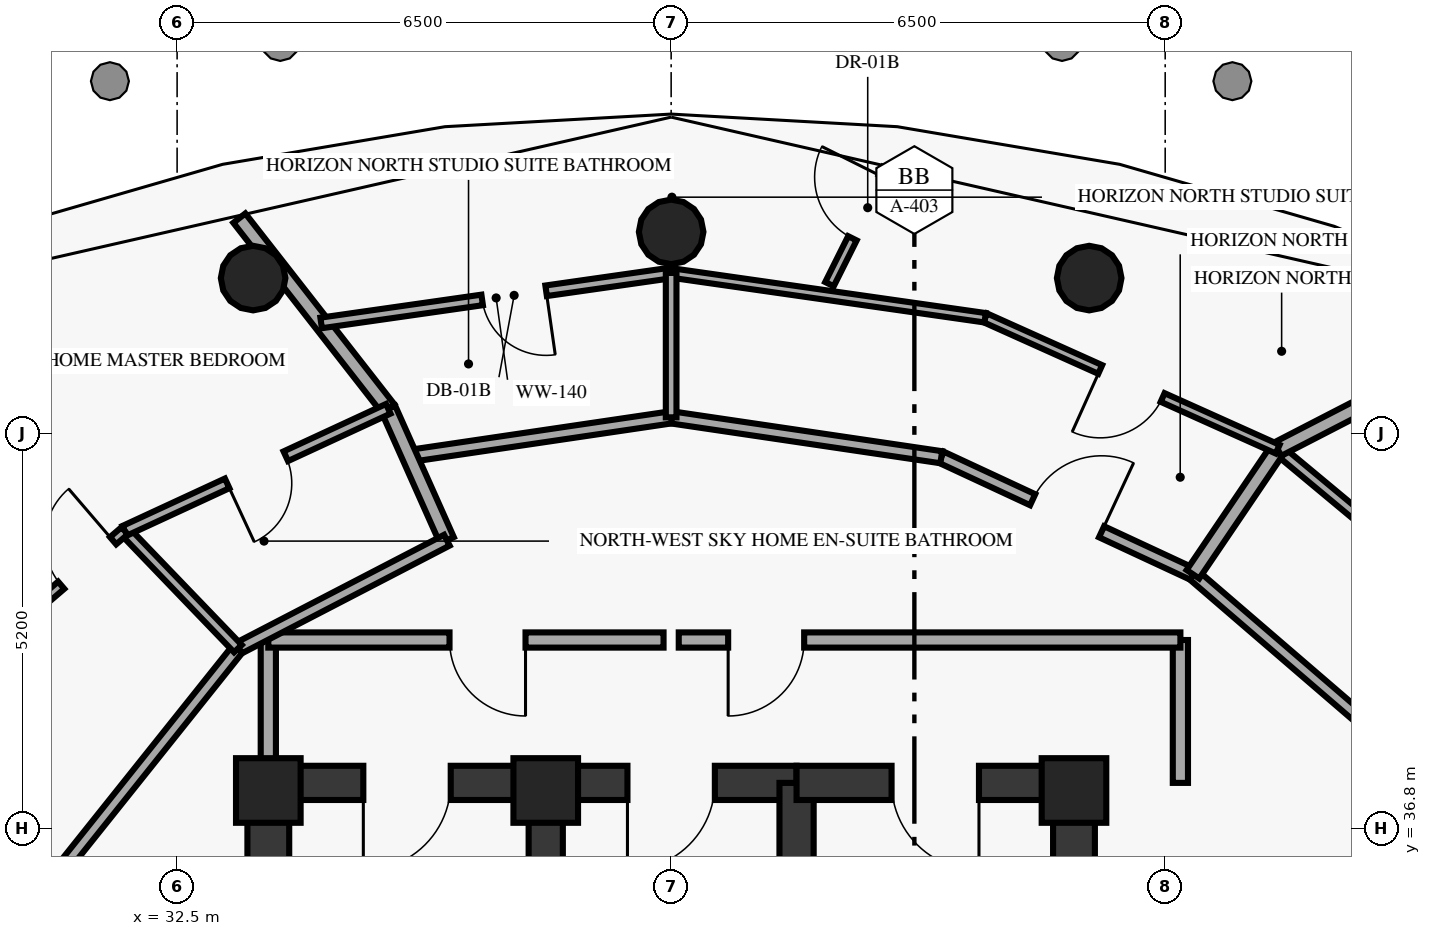
"""IFC4 building model, lengths in metres.
Left out: names, types, materials, properties, quantities, classifications, styles, units other than length and angle.
Written with IfcOpenShell. Run it as: python <this file> out.ifc"""

import sys

from ifc_helpers import new_model, si_unit, direction, frame, frame_2d, origin, origin_2d, place, context, subcontext, project, spatial, rectangle, circle, extrude, element, fill, save


model = new_model("IFC4")
c1 = context("Model", 3, precision=1e-05, world=origin(), true_north=direction((0.0, 1.0)))
c2 = subcontext(c1, "Body", "Model", "MODEL_VIEW")
j1 = project(units=[si_unit("LENGTHUNIT", "METRE"), si_unit("PLANEANGLEUNIT", "RADIAN")], contexts=[c1])
p1 = place(None, origin())
s1 = spatial("IfcSite", under=j1, at=p1, CompositionType="ELEMENT")
p2 = place(p1, origin())
s2 = spatial("IfcBuilding", under=s1, at=p2, CompositionType="ELEMENT")
p3 = place(p2, frame((0.0, 0.0, 251.95)))
s3 = spatial("IfcBuildingStorey", under=s2, at=p3, CompositionType="ELEMENT", Elevation=251.95)
for number, where, z_axis, x_axis in (
    (1, (44.3, 37.3, 0.0), (0.0, 0.0, 1.0), (1.0, 0.0, 0.0)),
    (2, (37.35, 37.3, 0.0), (0.0, 0.0, 1.0), (1.0, 0.0, 0.0)),
    (3, (33.7, 37.3, 0.0), (0.0, 0.0, 1.0), (1.0, 0.0, 0.0)),
):
    element("IfcColumn", number, at=place(p3, frame(where, z_axis=z_axis, x_axis=x_axis)), inside=s3, PredefinedType="PILASTER", context=c2, shape_type="SweptSolid", body=[
        extrude(rectangle(XDim=0.85, YDim=0.85, at=origin_2d()), origin(), (0.0, 0.0, 1.0), 3.39),
    ])
for number, where, z_axis, x_axis in (
    (4, (44.5, 44.042, 0.0), (0.0, 0.0, 1.0), (1.0, 0.0, 0.0)),
    (5, (39.0, 44.65, 0.0), (0.0, 0.0, 1.0), (1.0, 0.0, 0.0)),
    (6, (33.5, 44.042, 0.0), (0.0, 0.0, 1.0), (1.0, 0.0, 0.0)),
):
    element("IfcColumn", number, at=place(p3, frame(where, z_axis=z_axis, x_axis=x_axis)), inside=s3, PredefinedType="COLUMN", context=c2, shape_type="SweptSolid", body=[
        extrude(circle(Radius=0.425, at=origin_2d()), origin(), (0.0, 0.0, 1.0), 3.39),
    ])
for number, where, z_axis, x_axis in (
    (7, (33.7, 29.05, 0.0), (0.0, 0.0, 1.0), (0.0, 1.0, 0.0)),
    (8, (44.3, 29.05, 0.0), (0.0, 0.0, 1.0), (0.0, 1.0, 0.0)),
):
    element("IfcWall", number, at=place(p3, frame(where, z_axis=z_axis, x_axis=x_axis)), inside=s3, PredefinedType="SHEAR", context=c2, shape_type="SweptSolid", body=[
        extrude(rectangle(XDim=8.35, YDim=0.55, at=frame_2d((4.175, 0.0))), origin(), (0.0, 0.0, 1.0), 3.39),
    ])
p4 = place(p3, frame((37.35, 37.4, 0.0), z_axis=(0.0, 0.0, 1.0), x_axis=(-1.0, 0.0, 0.0)))
e9 = element("IfcWall", 9, at=p4, inside=s3, PredefinedType="SHEAR", context=c2, shape_type="SweptSolid", body=[
    extrude(rectangle(XDim=3.65, YDim=0.45, at=frame_2d((1.825, 0.0))), origin(), (0.0, 0.0, 1.0), 3.39),
])
p5 = place(p4, frame((1.25, 0.0, 0.0)))
e10 = element("IfcOpeningElement", 10, at=p5, cuts=e9, PredefinedType="OPENING", context=c2, shape_type="SweptSolid", body=[
    extrude(rectangle(XDim=1.15, YDim=2.15, at=frame_2d((0.575, 1.075))), frame((0.0, 0.235, 0.0), z_axis=(0.0, -1.0, 0.0), x_axis=(1.0, 0.0, 0.0)), (0.0, 0.0, 1.0), 0.47),
])
p6 = place(p3, frame((37.35, 29.05, 0.0), z_axis=(0.0, 0.0, 1.0), x_axis=(0.0, 1.0, 0.0)))
e11 = element("IfcWall", 11, at=p6, inside=s3, PredefinedType="SHEAR", context=c2, shape_type="SweptSolid", body=[
    extrude(rectangle(XDim=8.35, YDim=0.45, at=frame_2d((4.175, 0.0))), origin(), (0.0, 0.0, 1.0), 3.39),
])
p7 = place(p3, frame((40.65, 37.4, 0.0), z_axis=(0.0, 0.0, 1.0), x_axis=(-1.0, 0.0, 0.0)))
e12 = element("IfcWall", 12, at=p7, inside=s3, PredefinedType="SHEAR", context=c2, shape_type="SweptSolid", body=[
    extrude(rectangle(XDim=3.3, YDim=0.45, at=frame_2d((1.65, 0.0))), origin(), (0.0, 0.0, 1.0), 3.39),
])
p8 = place(p7, frame((1.075, 0.0, 0.0)))
e13 = element("IfcOpeningElement", 13, at=p8, cuts=e12, PredefinedType="OPENING", context=c2, shape_type="SweptSolid", body=[
    extrude(rectangle(XDim=1.15, YDim=2.15, at=frame_2d((0.575, 1.075))), frame((0.0, 0.235, 0.0), z_axis=(0.0, -1.0, 0.0), x_axis=(1.0, 0.0, 0.0)), (0.0, 0.0, 1.0), 0.47),
])
p9 = place(p3, frame((40.65, 29.05, 0.0), z_axis=(0.0, 0.0, 1.0), x_axis=(0.0, 1.0, 0.0)))
e14 = element("IfcWall", 14, at=p9, inside=s3, PredefinedType="SHEAR", context=c2, shape_type="SweptSolid", body=[
    extrude(rectangle(XDim=8.35, YDim=0.45, at=frame_2d((4.175, 0.0))), origin(), (0.0, 0.0, 1.0), 3.39),
])
p10 = place(p3, frame((44.3, 37.4, 0.0), z_axis=(0.0, 0.0, 1.0), x_axis=(-1.0, 0.0, 0.0)))
e15 = element("IfcWall", 15, at=p10, inside=s3, PredefinedType="SHEAR", context=c2, shape_type="SweptSolid", body=[
    extrude(rectangle(XDim=3.65, YDim=0.45, at=frame_2d((1.825, 0.0))), origin(), (0.0, 0.0, 1.0), 3.39),
])
p11 = place(p10, frame((1.25, 0.0, 0.0)))
e16 = element("IfcOpeningElement", 16, at=p11, cuts=e15, PredefinedType="OPENING", context=c2, shape_type="SweptSolid", body=[
    extrude(rectangle(XDim=1.15, YDim=2.15, at=frame_2d((0.575, 1.075))), frame((0.0, 0.235, 0.0), z_axis=(0.0, -1.0, 0.0), x_axis=(1.0, 0.0, 0.0)), (0.0, 0.0, 1.0), 0.47),
])
for number, where, z_axis, x_axis in (
    (17, (33.7, 37.4, 0.0), (0.0, 0.0, 1.0), (0.0, 1.0, 0.0)),
    (18, (45.7, 37.4, 0.0), (0.0, 0.0, 1.0), (0.0, 1.0, 0.0)),
):
    element("IfcWall", number, at=place(p3, frame(where, z_axis=z_axis, x_axis=x_axis)), inside=s3, PredefinedType="SOLIDWALL", context=c2, shape_type="SweptSolid", body=[
        extrude(rectangle(XDim=1.88, YDim=0.2, at=frame_2d((0.94, 0.0))), origin(), (0.0, 0.0, 1.0), 3.39),
    ])
p12 = place(p3, frame((38.9, 39.28, 0.0), z_axis=(0.0, 0.0, 1.0), x_axis=(-1.0, 0.0, 0.0)))
e19 = element("IfcWall", 19, at=p12, inside=s3, PredefinedType="SOLIDWALL", context=c2, shape_type="SweptSolid", body=[
    extrude(rectangle(XDim=5.2, YDim=0.2, at=frame_2d((2.6, 0.0))), origin(), (0.0, 0.0, 1.0), 3.39),
])
p13 = place(p12, frame((1.816, 0.0, 0.0)))
e20 = element("IfcOpeningElement", 20, at=p13, cuts=e19, PredefinedType="OPENING", context=c2, shape_type="SweptSolid", body=[
    extrude(rectangle(XDim=1.0, YDim=2.02, at=frame_2d((0.5, 1.01))), frame((0.0, 0.11, 0.0), z_axis=(0.0, -1.0, 0.0), x_axis=(1.0, 0.0, 0.0)), (0.0, 0.0, 1.0), 0.22),
])
p14 = place(p3, frame((45.7, 39.28, 0.0), z_axis=(0.0, 0.0, 1.0), x_axis=(-1.0, 0.0, 0.0)))
e21 = element("IfcWall", 21, at=p14, inside=s3, PredefinedType="SOLIDWALL", context=c2, shape_type="SweptSolid", body=[
    extrude(rectangle(XDim=6.6, YDim=0.2, at=frame_2d((3.3, 0.0))), origin(), (0.0, 0.0, 1.0), 3.39),
])
p15 = place(p14, frame((4.95, 0.0, 0.0)))
e22 = element("IfcOpeningElement", 22, at=p15, cuts=e21, PredefinedType="OPENING", context=c2, shape_type="SweptSolid", body=[
    extrude(rectangle(XDim=1.0, YDim=2.02, at=frame_2d((0.5, 1.01))), frame((0.0, 0.11, 0.0), z_axis=(0.0, -1.0, 0.0), x_axis=(1.0, 0.0, 0.0)), (0.0, 0.0, 1.0), 0.22),
])
p16 = place(p3, frame((48.709, 37.697, 0.0), z_axis=(0.0, 0.0, 1.0), x_axis=(-0.75790014932, 0.652370572344, 0.0)))
e23 = element("IfcWall", 23, at=p16, inside=s3, PredefinedType="PARTITIONING", context=c2, shape_type="SweptSolid", body=[
    extrude(rectangle(XDim=3.752, YDim=0.16, at=frame_2d((1.876, 0.0))), origin(), (0.0, 0.0, 1.0), 3.39),
])
p17 = place(p3, frame((42.554, 41.685, 0.0), z_axis=(0.0, 0.0, 1.0), x_axis=(0.906718733669, -0.421735862851, 0.0)))
e24 = element("IfcWall", 24, at=p17, inside=s3, PredefinedType="PARTITIONING", context=c2, shape_type="SweptSolid", body=[
    extrude(rectangle(XDim=3.652, YDim=0.16, at=frame_2d((1.826, 0.0))), origin(), (0.0, 0.0, 1.0), 3.39),
])
p18 = place(p17, frame((1.326, 0.0, 0.0)))
e25 = element("IfcOpeningElement", 25, at=p18, cuts=e24, PredefinedType="OPENING", context=c2, shape_type="SweptSolid", body=[
    extrude(rectangle(XDim=1.0, YDim=2.02, at=frame_2d((0.5, 1.01))), frame((0.0, 0.09, 0.0), z_axis=(0.0, -1.0, 0.0), x_axis=(1.0, 0.0, 0.0)), (0.0, 0.0, 1.0), 0.18),
])
p19 = place(p3, frame((42.554, 41.685, 0.0), z_axis=(0.0, 0.0, 1.0), x_axis=(-0.989268313231, 0.146110247541, 0.0)))
e26 = element("IfcWall", 26, at=p19, inside=s3, PredefinedType="PARTITIONING", context=c2, shape_type="SweptSolid", body=[
    extrude(rectangle(XDim=3.593, YDim=0.16, at=frame_2d((1.796, 0.0))), origin(), (0.0, 0.0, 1.0), 3.39),
])
p20 = place(p3, frame((39.0, 42.21, 0.0), z_axis=(0.0, 0.0, 1.0), x_axis=(-0.989259474357, -0.146170080365, 0.0)))
e27 = element("IfcWall", 27, at=p20, inside=s3, PredefinedType="PARTITIONING", context=c2, shape_type="SweptSolid", body=[
    extrude(rectangle(XDim=3.482, YDim=0.16, at=frame_2d((1.741, 0.0))), origin(), (0.0, 0.0, 1.0), 3.39),
])
p21 = place(p3, frame((36.049, 40.593, 0.0), z_axis=(0.0, 0.0, 1.0), x_axis=(-0.407262922325, 0.913310961338, 0.0)))
e28 = element("IfcWall", 28, at=p21, inside=s3, PredefinedType="PARTITIONING", context=c2, shape_type="SweptSolid", body=[
    extrude(rectangle(XDim=1.893, YDim=0.2, at=frame_2d((0.947, 0.0))), origin(), (0.0, 0.0, 1.0), 3.39),
])
p22 = place(p3, frame((35.278, 42.322, 0.0), z_axis=(0.0, 0.0, 1.0), x_axis=(-0.615410344966, 0.788206893721, 0.0)))
e29 = element("IfcWall", 29, at=p22, inside=s3, PredefinedType="PARTITIONING", context=c2, shape_type="SweptSolid", body=[
    extrude(rectangle(XDim=3.183, YDim=0.2, at=frame_2d((1.592, 0.0))), origin(), (0.0, 0.0, 1.0), 3.39),
])
p23 = place(p3, frame((46.98, 41.791, 0.0), z_axis=(0.0, 0.0, 1.0), x_axis=(0.768632414363, -0.639690715573, 0.0)))
e30 = element("IfcWall", 30, at=p23, inside=s3, PredefinedType="PARTITIONING", context=c2, shape_type="SweptSolid", body=[
    extrude(rectangle(XDim=1.606, YDim=0.14, at=frame_2d((0.803, 0.0))), origin(), (0.0, 0.0, 1.0), 3.39),
])
p24 = place(p3, frame((45.865, 40.145, 0.0), z_axis=(0.0, 0.0, 1.0), x_axis=(0.560834568606, 0.827927887353, 0.0)))
e31 = element("IfcWall", 31, at=p24, inside=s3, PredefinedType="PARTITIONING", context=c2, shape_type="SweptSolid", body=[
    extrude(rectangle(XDim=1.988, YDim=0.2, at=frame_2d((0.994, 0.0))), origin(), (0.0, 0.0, 1.0), 3.39),
])
p25 = place(p3, frame((46.98, 41.791, 0.0), z_axis=(0.0, 0.0, 1.0), x_axis=(0.888751319937, 0.458389671905, 0.0)))
e32 = element("IfcWall", 32, at=p25, inside=s3, PredefinedType="PARTITIONING", context=c2, shape_type="SweptSolid", body=[
    extrude(rectangle(XDim=3.807, YDim=0.2, at=frame_2d((1.903, 0.0))), origin(), (0.0, 0.0, 1.0), 3.39),
])
p26 = place(p3, frame((43.131, 43.52, 0.0), z_axis=(0.0, 0.0, 1.0), x_axis=(0.912186563344, -0.409775150118, 0.0)))
e33 = element("IfcWall", 33, at=p26, inside=s3, PredefinedType="PARTITIONING", context=c2, shape_type="SweptSolid", body=[
    extrude(rectangle(XDim=4.219, YDim=0.125, at=frame_2d((2.11, 0.0))), origin(), (0.0, 0.0, 1.0), 3.39),
])
p27 = place(p26, frame((1.66, 0.0, 0.0)))
e34 = element("IfcOpeningElement", 34, at=p27, cuts=e33, PredefinedType="OPENING", context=c2, shape_type="SweptSolid", body=[
    extrude(rectangle(XDim=0.9, YDim=2.02, at=frame_2d((0.45, 1.01))), frame((0.0, 0.073, 0.0), z_axis=(0.0, -1.0, 0.0), x_axis=(1.0, 0.0, 0.0)), (0.0, 0.0, 1.0), 0.145),
])
p28 = place(p3, frame((43.131, 43.52, 0.0), z_axis=(0.0, 0.0, 1.0), x_axis=(-0.989951833699, 0.141404975004, 0.0)))
e35 = element("IfcWall", 35, at=p28, inside=s3, PredefinedType="PARTITIONING", context=c2, shape_type="SweptSolid", body=[
    extrude(rectangle(XDim=4.173, YDim=0.125, at=frame_2d((2.086, 0.0))), origin(), (0.0, 0.0, 1.0), 3.39),
])
p29 = place(p3, frame((34.395, 43.452, 0.0), z_axis=(0.0, 0.0, 1.0), x_axis=(0.989938994285, 0.141494832393, 0.0)))
e36 = element("IfcWall", 36, at=p29, inside=s3, PredefinedType="PARTITIONING", context=c2, shape_type="SweptSolid", body=[
    extrude(rectangle(XDim=4.652, YDim=0.14, at=frame_2d((2.326, 0.0))), origin(), (0.0, 0.0, 1.0), 3.39),
])
p30 = place(p29, frame((2.14, 0.0, 0.0)))
e37 = element("IfcOpeningElement", 37, at=p30, cuts=e36, PredefinedType="OPENING", context=c2, shape_type="SweptSolid", body=[
    extrude(rectangle(XDim=0.85, YDim=2.02, at=frame_2d((0.425, 1.01))), frame((0.0, 0.08, 0.0), z_axis=(0.0, -1.0, 0.0), x_axis=(1.0, 0.0, 0.0)), (0.0, 0.0, 1.0), 0.16),
])
p31 = place(p3, frame((39.0, 42.21, 0.0), z_axis=(0.0, 0.0, 1.0), x_axis=(0.0, 1.0, 0.0)))
e38 = element("IfcWall", 38, at=p31, inside=s3, PredefinedType="PARTITIONING", context=c2, shape_type="SweptSolid", body=[
    extrude(rectangle(XDim=1.9, YDim=0.14, at=frame_2d((0.95, 0.0))), origin(), (0.0, 0.0, 1.0), 2.19),
])
p32 = place(p3, frame((41.083, 43.962, 0.0), z_axis=(0.0, 0.0, 1.0), x_axis=(0.4472135955, 0.894427191, 0.0)))
e39 = element("IfcWall", 39, at=p32, inside=s3, PredefinedType="PARTITIONING", context=c2, shape_type="SweptSolid", body=[
    extrude(rectangle(XDim=1.695, YDim=0.125, at=frame_2d((0.848, 0.0))), origin(), (0.0, 0.0, 1.0), 3.39),
])
p33 = place(p32, frame((0.675, 0.0, 0.0)))
e40 = element("IfcOpeningElement", 40, at=p33, cuts=e39, PredefinedType="OPENING", context=c2, shape_type="SweptSolid", body=[
    extrude(rectangle(XDim=0.9, YDim=2.02, at=frame_2d((0.45, 1.01))), frame((0.0, 0.073, 0.0), z_axis=(0.0, -1.0, 0.0), x_axis=(1.0, 0.0, 0.0)), (0.0, 0.0, 1.0), 0.145),
])
p34 = place(p3, frame((36.049, 40.593, 0.0), z_axis=(0.0, 0.0, 1.0), x_axis=(-0.887674575788, -0.460471331898, 0.0)))
e41 = element("IfcWall", 41, at=p34, inside=s3, PredefinedType="PARTITIONING", context=c2, shape_type="SweptSolid", body=[
    extrude(rectangle(XDim=3.097, YDim=0.16, at=frame_2d((1.548, 0.0))), origin(), (0.0, 0.0, 1.0), 3.39),
])
p35 = place(p3, frame((33.3, 39.167, 0.0), z_axis=(0.0, 0.0, 1.0), x_axis=(-0.623915746766, -0.781491612839, 0.0)))
e42 = element("IfcWall", 42, at=p35, inside=s3, PredefinedType="PARTITIONING", context=c2, shape_type="SweptSolid", body=[
    extrude(rectangle(XDim=6.688, YDim=0.16, at=frame_2d((3.344, 0.0))), origin(), (0.0, 0.0, 1.0), 3.39),
])
p36 = place(p3, frame((33.3, 39.167, 0.0), z_axis=(0.0, 0.0, 1.0), x_axis=(-0.693002052722, 0.720935610803, 0.0)))
e43 = element("IfcWall", 43, at=p36, inside=s3, PredefinedType="PARTITIONING", context=c2, shape_type="SweptSolid", body=[
    extrude(rectangle(XDim=2.15, YDim=0.14, at=frame_2d((1.075, 0.0))), origin(), (0.0, 0.0, 1.0), 3.39),
])
p37 = place(p3, frame((31.81, 40.717, 0.0), z_axis=(0.0, 0.0, 1.0), x_axis=(0.907525084777, 0.419997881543, 0.0)))
e44 = element("IfcWall", 44, at=p37, inside=s3, PredefinedType="PARTITIONING", context=c2, shape_type="SweptSolid", body=[
    extrude(rectangle(XDim=3.821, YDim=0.14, at=frame_2d((1.911, 0.0))), origin(), (0.0, 0.0, 1.0), 3.39),
])
p38 = place(p37, frame((1.486, 0.0, 0.0)))
e45 = element("IfcOpeningElement", 45, at=p38, cuts=e44, PredefinedType="OPENING", context=c2, shape_type="SweptSolid", body=[
    extrude(rectangle(XDim=0.85, YDim=2.02, at=frame_2d((0.425, 1.01))), frame((0.0, 0.08, 0.0), z_axis=(0.0, -1.0, 0.0), x_axis=(1.0, 0.0, 0.0)), (0.0, 0.0, 1.0), 0.16),
])
p39 = place(p3, frame((28.832, 38.163, 0.0), z_axis=(0.0, 0.0, 1.0), x_axis=(0.759085259689, 0.650991220004, 0.0)))
e46 = element("IfcWall", 46, at=p39, inside=s3, PredefinedType="PARTITIONING", context=c2, shape_type="SweptSolid", body=[
    extrude(rectangle(XDim=3.923, YDim=0.125, at=frame_2d((1.961, 0.0))), origin(), (0.0, 0.0, 1.0), 3.39),
])
p40 = place(p39, frame((2.823, 0.0, 0.0)))
e47 = element("IfcOpeningElement", 47, at=p40, cuts=e46, PredefinedType="OPENING", context=c2, shape_type="SweptSolid", body=[
    extrude(rectangle(XDim=0.9, YDim=2.02, at=frame_2d((0.45, 1.01))), frame((0.0, 0.073, 0.0), z_axis=(0.0, -1.0, 0.0), x_axis=(1.0, 0.0, 0.0)), (0.0, 0.0, 1.0), 0.145),
])
p41 = place(p5, origin())
e48 = element("IfcDoor", 48, at=p41, inside=s3, OperationType="SINGLE_SWING_RIGHT", PredefinedType="DOOR", context=c2, shape_type="SweptSolid", body=[
    extrude(rectangle(XDim=1.15, YDim=2.15, at=frame_2d((0.575, 1.075))), frame((0.0, 0.025, 0.0), z_axis=(0.0, -1.0, 0.0), x_axis=(1.0, 0.0, 0.0)), (0.0, 0.0, 1.0), 0.05),
])
fill(e10, e48)
p42 = place(p8, origin())
e49 = element("IfcDoor", 49, at=p42, inside=s3, OperationType="SINGLE_SWING_RIGHT", PredefinedType="DOOR", context=c2, shape_type="SweptSolid", body=[
    extrude(rectangle(XDim=1.15, YDim=2.15, at=frame_2d((0.575, 1.075))), frame((0.0, 0.025, 0.0), z_axis=(0.0, -1.0, 0.0), x_axis=(1.0, 0.0, 0.0)), (0.0, 0.0, 1.0), 0.05),
])
fill(e13, e49)
p43 = place(p11, origin())
e50 = element("IfcDoor", 50, at=p43, inside=s3, OperationType="SINGLE_SWING_LEFT", PredefinedType="DOOR", context=c2, shape_type="SweptSolid", body=[
    extrude(rectangle(XDim=1.15, YDim=2.15, at=frame_2d((0.575, 1.075))), frame((0.0, 0.025, 0.0), z_axis=(0.0, -1.0, 0.0), x_axis=(1.0, 0.0, 0.0)), (0.0, 0.0, 1.0), 0.05),
])
fill(e16, e50)
p44 = place(p13, origin())
e51 = element("IfcDoor", 51, at=p44, inside=s3, OperationType="SINGLE_SWING_LEFT", PredefinedType="DOOR", context=c2, shape_type="SweptSolid", body=[
    extrude(rectangle(XDim=1.0, YDim=2.02, at=frame_2d((0.5, 1.01))), frame((0.0, 0.025, 0.0), z_axis=(0.0, -1.0, 0.0), x_axis=(1.0, 0.0, 0.0)), (0.0, 0.0, 1.0), 0.05),
])
fill(e20, e51)
p45 = place(p15, origin())
e52 = element("IfcDoor", 52, at=p45, inside=s3, OperationType="SINGLE_SWING_RIGHT", PredefinedType="DOOR", context=c2, shape_type="SweptSolid", body=[
    extrude(rectangle(XDim=1.0, YDim=2.02, at=frame_2d((0.5, 1.01))), frame((0.0, 0.025, 0.0), z_axis=(0.0, -1.0, 0.0), x_axis=(1.0, 0.0, 0.0)), (0.0, 0.0, 1.0), 0.05),
])
fill(e22, e52)
p46 = place(p18, origin())
e53 = element("IfcDoor", 53, at=p46, inside=s3, OperationType="SINGLE_SWING_RIGHT", PredefinedType="DOOR", context=c2, shape_type="SweptSolid", body=[
    extrude(rectangle(XDim=1.0, YDim=2.02, at=frame_2d((0.5, 1.01))), frame((0.0, 0.025, 0.0), z_axis=(0.0, -1.0, 0.0), x_axis=(1.0, 0.0, 0.0)), (0.0, 0.0, 1.0), 0.05),
])
fill(e25, e53)
p47 = place(p27, origin())
e54 = element("IfcDoor", 54, at=p47, inside=s3, OperationType="SINGLE_SWING_LEFT", PredefinedType="DOOR", context=c2, shape_type="SweptSolid", body=[
    extrude(rectangle(XDim=0.9, YDim=2.02, at=frame_2d((0.45, 1.01))), frame((0.0, 0.025, 0.0), z_axis=(0.0, -1.0, 0.0), x_axis=(1.0, 0.0, 0.0)), (0.0, 0.0, 1.0), 0.05),
])
fill(e34, e54)
p48 = place(p30, origin())
e55 = element("IfcDoor", 55, at=p48, inside=s3, OperationType="SINGLE_SWING_RIGHT", PredefinedType="DOOR", context=c2, shape_type="SweptSolid", body=[
    extrude(rectangle(XDim=0.85, YDim=2.02, at=frame_2d((0.425, 1.01))), frame((0.0, 0.025, 0.0), z_axis=(0.0, -1.0, 0.0), x_axis=(1.0, 0.0, 0.0)), (0.0, 0.0, 1.0), 0.05),
])
fill(e37, e55)
p49 = place(p33, origin())
e56 = element("IfcDoor", 56, at=p49, inside=s3, OperationType="SINGLE_SWING_RIGHT", PredefinedType="DOOR", context=c2, shape_type="SweptSolid", body=[
    extrude(rectangle(XDim=0.9, YDim=2.02, at=frame_2d((0.45, 1.01))), frame((0.0, 0.025, 0.0), z_axis=(0.0, -1.0, 0.0), x_axis=(1.0, 0.0, 0.0)), (0.0, 0.0, 1.0), 0.05),
])
fill(e40, e56)
p50 = place(p38, origin())
e57 = element("IfcDoor", 57, at=p50, inside=s3, OperationType="SINGLE_SWING_LEFT", PredefinedType="DOOR", context=c2, shape_type="SweptSolid", body=[
    extrude(rectangle(XDim=0.85, YDim=2.02, at=frame_2d((0.425, 1.01))), frame((0.0, 0.025, 0.0), z_axis=(0.0, -1.0, 0.0), x_axis=(1.0, 0.0, 0.0)), (0.0, 0.0, 1.0), 0.05),
])
fill(e45, e57)
p51 = place(p40, origin())
e58 = element("IfcDoor", 58, at=p51, inside=s3, OperationType="SINGLE_SWING_RIGHT", PredefinedType="DOOR", context=c2, shape_type="SweptSolid", body=[
    extrude(rectangle(XDim=0.9, YDim=2.02, at=frame_2d((0.45, 1.01))), frame((0.0, 0.025, 0.0), z_axis=(0.0, -1.0, 0.0), x_axis=(1.0, 0.0, 0.0)), (0.0, 0.0, 1.0), 0.05),
])
fill(e47, e58)
save(model, sys.argv[1])
